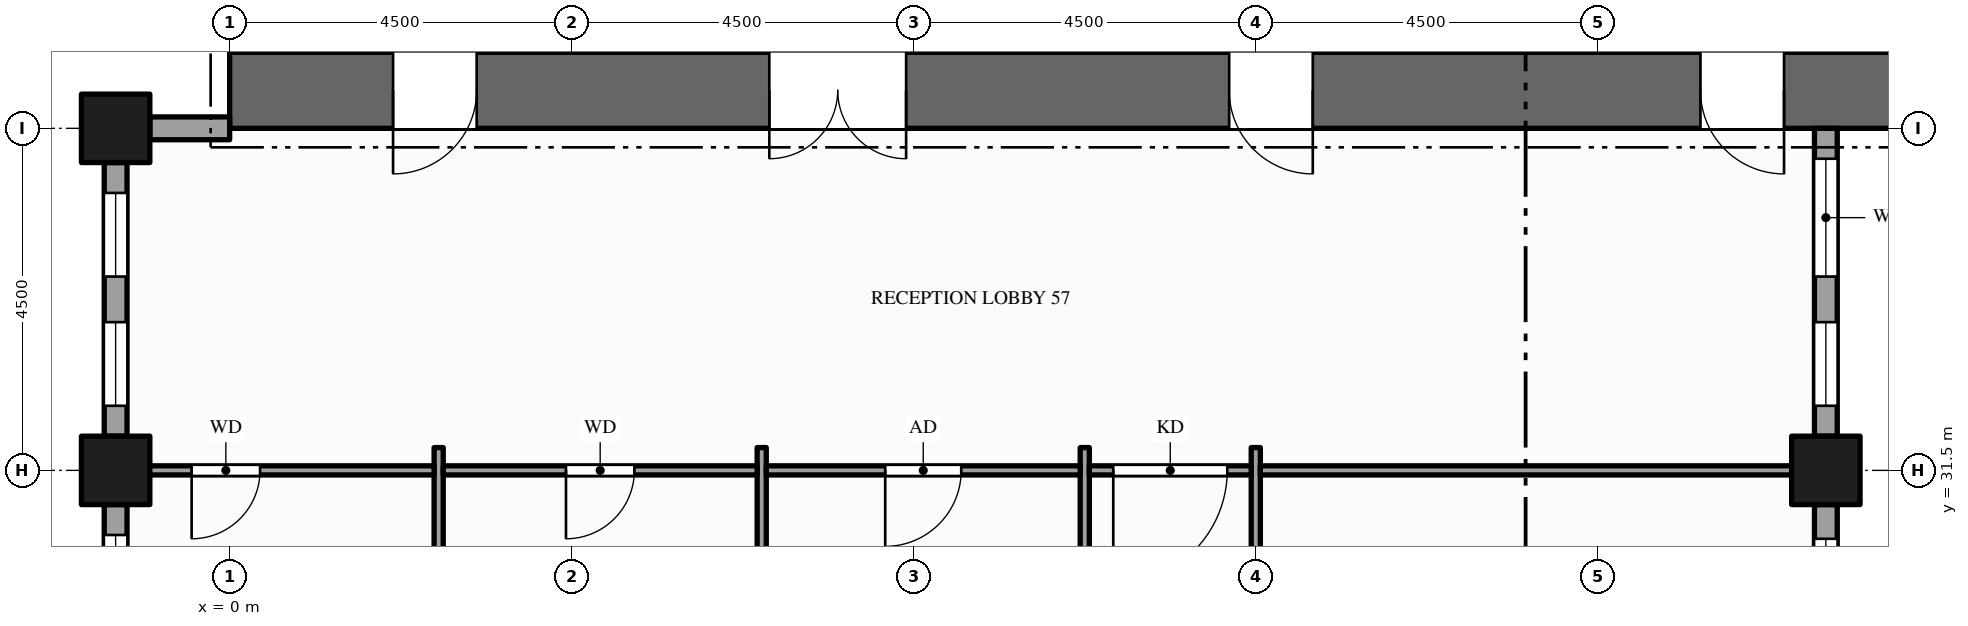
"""IFC4 building model, lengths in metres.
Left out: names, types, materials, properties, quantities, classifications, styles, units other than length and angle.
Written with IfcOpenShell. Run it as: python <this file> out.ifc"""

import sys

from ifc_helpers import new_model, si_unit, direction, frame, frame_2d, origin, origin_2d, place, context, subcontext, project, spatial, rectangle, hollow_rectangle, extrude, element, fill, save


model = new_model("IFC4")
c1 = context("Model", 3, precision=1e-05, world=origin(), true_north=direction((0.0, 1.0)))
c2 = subcontext(c1, "Body", "Model", "MODEL_VIEW")
j1 = project(units=[si_unit("LENGTHUNIT", "METRE"), si_unit("PLANEANGLEUNIT", "RADIAN")], contexts=[c1])
p1 = place(None, origin())
s1 = spatial("IfcSite", under=j1, at=p1, CompositionType="ELEMENT")
p2 = place(p1, origin())
s2 = spatial("IfcBuilding", under=s1, at=p2, CompositionType="ELEMENT")
p3 = place(p2, frame((0.0, 0.0, 151.0)))
s3 = spatial("IfcBuildingStorey", under=s2, at=p3, CompositionType="ELEMENT", Elevation=151.0)
p4 = place(p3, frame((0.0, 36.5, -0.15), z_axis=(0.0, 0.0, 1.0), x_axis=(1.0, 0.0, 0.0)))
e1 = element("IfcWall", 1, at=p4, inside=s3, PredefinedType="SHEAR", context=c2, shape_type="SweptSolid", body=[
    extrude(rectangle(XDim=22.5, YDim=1.0, at=frame_2d((11.25, 0.0))), origin(), (0.0, 0.0, 1.0), 4.0),
])
p5 = place(p4, frame((7.1, 0.0, 0.15)))
e2 = element("IfcOpeningElement", 2, at=p5, cuts=e1, PredefinedType="OPENING", context=c2, shape_type="SweptSolid", body=[
    extrude(rectangle(XDim=1.8, YDim=2.1, at=frame_2d((0.9, 1.05))), frame((0.0, 0.51, 0.0), z_axis=(0.0, -1.0, 0.0), x_axis=(1.0, 0.0, 0.0)), (0.0, 0.0, 1.0), 1.02),
])
p6 = place(p4, frame((13.15, 0.0, 0.15)))
e3 = element("IfcOpeningElement", 3, at=p6, cuts=e1, PredefinedType="OPENING", context=c2, shape_type="SweptSolid", body=[
    extrude(rectangle(XDim=1.1, YDim=2.1, at=frame_2d((0.55, 1.05))), frame((0.0, 0.51, 0.0), z_axis=(0.0, -1.0, 0.0), x_axis=(1.0, 0.0, 0.0)), (0.0, 0.0, 1.0), 1.02),
])
p7 = place(p4, frame((2.15, 0.0, 0.15)))
e4 = element("IfcOpeningElement", 4, at=p7, cuts=e1, PredefinedType="OPENING", context=c2, shape_type="SweptSolid", body=[
    extrude(rectangle(XDim=1.1, YDim=2.1, at=frame_2d((0.55, 1.05))), frame((0.0, 0.51, 0.0), z_axis=(0.0, -1.0, 0.0), x_axis=(1.0, 0.0, 0.0)), (0.0, 0.0, 1.0), 1.02),
])
p8 = place(p4, frame((19.35, 0.0, 0.15)))
e5 = element("IfcOpeningElement", 5, at=p8, cuts=e1, PredefinedType="OPENING", context=c2, shape_type="SweptSolid", body=[
    extrude(rectangle(XDim=1.1, YDim=2.1, at=frame_2d((0.55, 1.05))), frame((0.0, 0.51, 0.0), z_axis=(0.0, -1.0, 0.0), x_axis=(1.0, 0.0, 0.0)), (0.0, 0.0, 1.0), 1.02),
])
for number, where, z_axis, x_axis in (
    (6, (-1.5, 31.5, -0.15), (0.0, 0.0, 1.0), (1.0, 0.0, 0.0)),
    (7, (-1.5, 36.0, -0.15), (0.0, 0.0, 1.0), (1.0, 0.0, 0.0)),
    (8, (21.0, 31.5, -0.15), (0.0, 0.0, 1.0), (1.0, 0.0, 0.0)),
):
    element("IfcColumn", number, at=place(p3, frame(where, z_axis=z_axis, x_axis=x_axis)), inside=s3, PredefinedType="COLUMN", context=c2, shape_type="SweptSolid", body=[
        extrude(hollow_rectangle(XDim=0.9, YDim=0.9, WallThickness=0.045, at=origin_2d()), origin(), (0.0, 0.0, 1.0), 4.0),
    ])
p9 = place(p3, frame((21.0, 28.95, 0.0), z_axis=(0.0, 0.0, 1.0), x_axis=(0.0, 1.0, 0.0)))
e9 = element("IfcWall", 9, at=p9, inside=s3, PredefinedType="STANDARD", context=c2, shape_type="SweptSolid", body=[
    extrude(rectangle(XDim=2.1, YDim=0.3, at=frame_2d((1.05, 0.0))), origin(), (0.0, 0.0, 1.0), 3.149),
])
p10 = place(p9, frame((0.45, 0.0, 0.9)))
e10 = element("IfcOpeningElement", 10, at=p10, cuts=e9, PredefinedType="OPENING", context=c2, shape_type="SweptSolid", body=[
    extrude(rectangle(XDim=1.2, YDim=2.0, at=frame_2d((0.6, 1.0))), frame((0.0, 0.16, 0.0), z_axis=(0.0, -1.0, 0.0), x_axis=(1.0, 0.0, 0.0)), (0.0, 0.0, 1.0), 0.32),
])
p11 = place(p3, frame((21.0, 31.95, 0.0), z_axis=(0.0, 0.0, 1.0), x_axis=(0.0, 1.0, 0.0)))
e11 = element("IfcWall", 11, at=p11, inside=s3, PredefinedType="STANDARD", context=c2, shape_type="SweptSolid", body=[
    extrude(rectangle(XDim=4.05, YDim=0.3, at=frame_2d((2.025, 0.0))), origin(), (0.0, 0.0, 1.0), 3.149),
])
p12 = place(p11, frame((0.4, 0.0, 0.9)))
e12 = element("IfcOpeningElement", 12, at=p12, cuts=e11, PredefinedType="OPENING", context=c2, shape_type="SweptSolid", body=[
    extrude(rectangle(XDim=1.1, YDim=2.0, at=frame_2d((0.55, 1.0))), frame((0.0, 0.16, 0.0), z_axis=(0.0, -1.0, 0.0), x_axis=(1.0, 0.0, 0.0)), (0.0, 0.0, 1.0), 0.32),
])
p13 = place(p11, frame((2.1, 0.0, 0.9)))
e13 = element("IfcOpeningElement", 13, at=p13, cuts=e11, PredefinedType="OPENING", context=c2, shape_type="SweptSolid", body=[
    extrude(rectangle(XDim=1.55, YDim=2.0, at=frame_2d((0.775, 1.0))), frame((0.0, 0.16, 0.0), z_axis=(0.0, -1.0, 0.0), x_axis=(1.0, 0.0, 0.0)), (0.0, 0.0, 1.0), 0.32),
])
p14 = place(p3, frame((0.0, 36.0, 0.0), z_axis=(0.0, 0.0, 1.0), x_axis=(-1.0, 0.0, 0.0)))
e14 = element("IfcWall", 14, at=p14, inside=s3, PredefinedType="STANDARD", context=c2, shape_type="SweptSolid", body=[
    extrude(rectangle(XDim=1.05, YDim=0.3, at=frame_2d((0.525, 0.0))), origin(), (0.0, 0.0, 1.0), 2.87),
])
p15 = place(p3, frame((-1.5, 35.55, 0.0), z_axis=(0.0, 0.0, 1.0), x_axis=(0.0, -1.0, 0.0)))
e15 = element("IfcWall", 15, at=p15, inside=s3, PredefinedType="STANDARD", context=c2, shape_type="SweptSolid", body=[
    extrude(rectangle(XDim=3.6, YDim=0.3, at=frame_2d((1.8, 0.0))), origin(), (0.0, 0.0, 1.0), 3.149),
])
p16 = place(p15, frame((0.4, 0.0, 0.9)))
e16 = element("IfcOpeningElement", 16, at=p16, cuts=e15, PredefinedType="OPENING", context=c2, shape_type="SweptSolid", body=[
    extrude(rectangle(XDim=1.1, YDim=2.0, at=frame_2d((0.55, 1.0))), frame((0.0, 0.16, 0.0), z_axis=(0.0, -1.0, 0.0), x_axis=(1.0, 0.0, 0.0)), (0.0, 0.0, 1.0), 0.32),
])
p17 = place(p15, frame((2.1, 0.0, 0.9)))
e17 = element("IfcOpeningElement", 17, at=p17, cuts=e15, PredefinedType="OPENING", context=c2, shape_type="SweptSolid", body=[
    extrude(rectangle(XDim=1.1, YDim=2.0, at=frame_2d((0.55, 1.0))), frame((0.0, 0.16, 0.0), z_axis=(0.0, -1.0, 0.0), x_axis=(1.0, 0.0, 0.0)), (0.0, 0.0, 1.0), 0.32),
])
p18 = place(p3, frame((-1.5, 31.05, 0.0), z_axis=(0.0, 0.0, 1.0), x_axis=(0.0, -1.0, 0.0)))
e18 = element("IfcWall", 18, at=p18, inside=s3, PredefinedType="STANDARD", context=c2, shape_type="SweptSolid", body=[
    extrude(rectangle(XDim=3.6, YDim=0.3, at=frame_2d((1.8, 0.0))), origin(), (0.0, 0.0, 1.0), 3.149),
])
p19 = place(p18, frame((0.4, 0.0, 0.9)))
e19 = element("IfcOpeningElement", 19, at=p19, cuts=e18, PredefinedType="OPENING", context=c2, shape_type="SweptSolid", body=[
    extrude(rectangle(XDim=1.1, YDim=2.0, at=frame_2d((0.55, 1.0))), frame((0.0, 0.16, 0.0), z_axis=(0.0, -1.0, 0.0), x_axis=(1.0, 0.0, 0.0)), (0.0, 0.0, 1.0), 0.32),
])
p20 = place(p18, frame((2.1, 0.0, 0.9)))
e20 = element("IfcOpeningElement", 20, at=p20, cuts=e18, PredefinedType="OPENING", context=c2, shape_type="SweptSolid", body=[
    extrude(rectangle(XDim=1.1, YDim=2.0, at=frame_2d((0.55, 1.0))), frame((0.0, 0.16, 0.0), z_axis=(0.0, -1.0, 0.0), x_axis=(1.0, 0.0, 0.0)), (0.0, 0.0, 1.0), 0.32),
])
for number, where, z_axis, x_axis in (
    (21, (2.75, 26.7, 0.0), (0.0, 0.0, 1.0), (0.0, 1.0, 0.0)),
    (22, (7.0, 26.7, 0.0), (0.0, 0.0, 1.0), (0.0, 1.0, 0.0)),
):
    element("IfcWall", number, at=place(p3, frame(where, z_axis=z_axis, x_axis=x_axis)), inside=s3, PredefinedType="PARTITIONING", context=c2, shape_type="SweptSolid", body=[
        extrude(rectangle(XDim=5.1, YDim=0.12, at=frame_2d((2.55, 0.0))), origin(), (0.0, 0.0, 1.0), 3.85),
    ])
p21 = place(p3, frame((11.25, 10.95, 0.0), z_axis=(0.0, 0.0, 1.0), x_axis=(0.0, 1.0, 0.0)))
e23 = element("IfcWall", 23, at=p21, inside=s3, PredefinedType="PARTITIONING", context=c2, shape_type="SweptSolid", body=[
    extrude(rectangle(XDim=20.85, YDim=0.12, at=frame_2d((10.425, 0.0))), origin(), (0.0, 0.0, 1.0), 2.6),
])
p22 = place(p21, frame((2.05, 0.0, 0.0)))
e24 = element("IfcOpeningElement", 24, at=p22, cuts=e23, PredefinedType="OPENING", context=c2, shape_type="SweptSolid", body=[
    extrude(rectangle(XDim=1.0, YDim=2.1, at=frame_2d((0.5, 1.05))), frame((0.0, 0.07, 0.0), z_axis=(0.0, -1.0, 0.0), x_axis=(1.0, 0.0, 0.0)), (0.0, 0.0, 1.0), 0.14),
])
p23 = place(p21, frame((6.55, 0.0, 0.0)))
e25 = element("IfcOpeningElement", 25, at=p23, cuts=e23, PredefinedType="OPENING", context=c2, shape_type="SweptSolid", body=[
    extrude(rectangle(XDim=1.0, YDim=2.1, at=frame_2d((0.5, 1.05))), frame((0.0, 0.07, 0.0), z_axis=(0.0, -1.0, 0.0), x_axis=(1.0, 0.0, 0.0)), (0.0, 0.0, 1.0), 0.14),
])
p24 = place(p21, frame((12.205, 0.0, 0.0)))
e26 = element("IfcOpeningElement", 26, at=p24, cuts=e23, PredefinedType="OPENING", context=c2, shape_type="SweptSolid", body=[
    extrude(rectangle(XDim=1.0, YDim=2.1, at=frame_2d((0.5, 1.05))), frame((0.0, 0.07, 0.0), z_axis=(0.0, -1.0, 0.0), x_axis=(1.0, 0.0, 0.0)), (0.0, 0.0, 1.0), 0.14),
])
p25 = place(p3, frame((13.5, 10.95, 0.0), z_axis=(0.0, 0.0, 1.0), x_axis=(0.0, 1.0, 0.0)))
e27 = element("IfcWall", 27, at=p25, inside=s3, PredefinedType="PARTITIONING", context=c2, shape_type="SweptSolid", body=[
    extrude(rectangle(XDim=20.85, YDim=0.12, at=frame_2d((10.425, 0.0))), origin(), (0.0, 0.0, 1.0), 2.6),
])
p26 = place(p25, frame((17.8, 0.0, 0.0)))
e28 = element("IfcOpeningElement", 28, at=p26, cuts=e27, PredefinedType="OPENING", context=c2, shape_type="SweptSolid", body=[
    extrude(rectangle(XDim=1.0, YDim=2.1, at=frame_2d((0.5, 1.05))), frame((0.0, 0.07, 0.0), z_axis=(0.0, -1.0, 0.0), x_axis=(1.0, 0.0, 0.0)), (0.0, 0.0, 1.0), 0.14),
])
p27 = place(p25, frame((4.2, 0.0, 0.0)))
e29 = element("IfcOpeningElement", 29, at=p27, cuts=e27, PredefinedType="OPENING", context=c2, shape_type="SweptSolid", body=[
    extrude(rectangle(XDim=1.2, YDim=2.1, at=frame_2d((0.6, 1.05))), frame((0.0, 0.07, 0.0), z_axis=(0.0, -1.0, 0.0), x_axis=(1.0, 0.0, 0.0)), (0.0, 0.0, 1.0), 0.14),
])
p28 = place(p3, frame((-1.35, 31.5, 0.0), z_axis=(0.0, 0.0, 1.0), x_axis=(1.0, 0.0, 0.0)))
e30 = element("IfcWall", 30, at=p28, inside=s3, PredefinedType="PARTITIONING", context=c2, shape_type="SweptSolid", body=[
    extrude(rectangle(XDim=4.04, YDim=0.12, at=frame_2d((2.02, 0.0))), origin(), (0.0, 0.0, 1.0), 2.87),
])
p29 = place(p28, frame((0.85, 0.0, 0.0)))
e31 = element("IfcOpeningElement", 31, at=p29, cuts=e30, PredefinedType="OPENING", context=c2, shape_type="SweptSolid", body=[
    extrude(rectangle(XDim=0.9, YDim=2.1, at=frame_2d((0.45, 1.05))), frame((0.0, 0.07, 0.0), z_axis=(0.0, -1.0, 0.0), x_axis=(1.0, 0.0, 0.0)), (0.0, 0.0, 1.0), 0.14),
])
p30 = place(p3, frame((2.81, 31.5, 0.0), z_axis=(0.0, 0.0, 1.0), x_axis=(1.0, 0.0, 0.0)))
e32 = element("IfcWall", 32, at=p30, inside=s3, PredefinedType="PARTITIONING", context=c2, shape_type="SweptSolid", body=[
    extrude(rectangle(XDim=4.13, YDim=0.12, at=frame_2d((2.065, 0.0))), origin(), (0.0, 0.0, 1.0), 2.87),
])
p31 = place(p30, frame((1.615, 0.0, 0.0)))
e33 = element("IfcOpeningElement", 33, at=p31, cuts=e32, PredefinedType="OPENING", context=c2, shape_type="SweptSolid", body=[
    extrude(rectangle(XDim=0.9, YDim=2.1, at=frame_2d((0.45, 1.05))), frame((0.0, 0.07, 0.0), z_axis=(0.0, -1.0, 0.0), x_axis=(1.0, 0.0, 0.0)), (0.0, 0.0, 1.0), 0.14),
])
p32 = place(p3, frame((7.06, 31.5, 0.0), z_axis=(0.0, 0.0, 1.0), x_axis=(1.0, 0.0, 0.0)))
e34 = element("IfcWall", 34, at=p32, inside=s3, PredefinedType="PARTITIONING", context=c2, shape_type="SweptSolid", body=[
    extrude(rectangle(XDim=4.13, YDim=0.12, at=frame_2d((2.065, 0.0))), origin(), (0.0, 0.0, 1.0), 2.87),
])
p33 = place(p32, frame((1.565, 0.0, 0.0)))
e35 = element("IfcOpeningElement", 35, at=p33, cuts=e34, PredefinedType="OPENING", context=c2, shape_type="SweptSolid", body=[
    extrude(rectangle(XDim=1.0, YDim=2.1, at=frame_2d((0.5, 1.05))), frame((0.0, 0.07, 0.0), z_axis=(0.0, -1.0, 0.0), x_axis=(1.0, 0.0, 0.0)), (0.0, 0.0, 1.0), 0.14),
])
p34 = place(p3, frame((11.31, 31.5, 0.0), z_axis=(0.0, 0.0, 1.0), x_axis=(1.0, 0.0, 0.0)))
e36 = element("IfcWall", 36, at=p34, inside=s3, PredefinedType="PARTITIONING", context=c2, shape_type="SweptSolid", body=[
    extrude(rectangle(XDim=2.13, YDim=0.12, at=frame_2d((1.065, 0.0))), origin(), (0.0, 0.0, 1.0), 2.87),
])
p35 = place(p34, frame((0.315, 0.0, 0.0)))
e37 = element("IfcOpeningElement", 37, at=p35, cuts=e36, PredefinedType="OPENING", context=c2, shape_type="SweptSolid", body=[
    extrude(rectangle(XDim=1.5, YDim=2.1, at=frame_2d((0.75, 1.05))), frame((0.0, 0.07, 0.0), z_axis=(0.0, -1.0, 0.0), x_axis=(1.0, 0.0, 0.0)), (0.0, 0.0, 1.0), 0.14),
])
p36 = place(p3, frame((13.56, 31.5, 0.0), z_axis=(0.0, 0.0, 1.0), x_axis=(1.0, 0.0, 0.0)))
e38 = element("IfcWall", 38, at=p36, inside=s3, PredefinedType="PARTITIONING", context=c2, shape_type="SweptSolid", body=[
    extrude(rectangle(XDim=7.29, YDim=0.12, at=frame_2d((3.645, 0.0))), origin(), (0.0, 0.0, 1.0), 2.87),
])
p37 = place(p10, origin())
e39 = element("IfcWindow", 39, at=p37, inside=s3, PartitioningType="SINGLE_PANEL", PredefinedType="WINDOW", context=c2, shape_type="SweptSolid", body=[
    extrude(rectangle(XDim=1.2, YDim=2.0, at=frame_2d((0.6, 1.0))), frame((0.0, 0.03, 0.0), z_axis=(0.0, -1.0, 0.0), x_axis=(1.0, 0.0, 0.0)), (0.0, 0.0, 1.0), 0.06),
])
fill(e10, e39)
p38 = place(p12, origin())
e40 = element("IfcWindow", 40, at=p38, inside=s3, PartitioningType="SINGLE_PANEL", PredefinedType="WINDOW", context=c2, shape_type="SweptSolid", body=[
    extrude(rectangle(XDim=1.1, YDim=2.0, at=frame_2d((0.55, 1.0))), frame((0.0, 0.03, 0.0), z_axis=(0.0, -1.0, 0.0), x_axis=(1.0, 0.0, 0.0)), (0.0, 0.0, 1.0), 0.06),
])
fill(e12, e40)
p39 = place(p13, origin())
e41 = element("IfcWindow", 41, at=p39, inside=s3, PartitioningType="SINGLE_PANEL", PredefinedType="WINDOW", context=c2, shape_type="SweptSolid", body=[
    extrude(rectangle(XDim=1.55, YDim=2.0, at=frame_2d((0.775, 1.0))), frame((0.0, 0.03, 0.0), z_axis=(0.0, -1.0, 0.0), x_axis=(1.0, 0.0, 0.0)), (0.0, 0.0, 1.0), 0.06),
])
fill(e13, e41)
p40 = place(p16, origin())
e42 = element("IfcWindow", 42, at=p40, inside=s3, PartitioningType="SINGLE_PANEL", PredefinedType="WINDOW", context=c2, shape_type="SweptSolid", body=[
    extrude(rectangle(XDim=1.1, YDim=2.0, at=frame_2d((0.55, 1.0))), frame((0.0, 0.03, 0.0), z_axis=(0.0, -1.0, 0.0), x_axis=(1.0, 0.0, 0.0)), (0.0, 0.0, 1.0), 0.06),
])
fill(e16, e42)
p41 = place(p17, origin())
e43 = element("IfcWindow", 43, at=p41, inside=s3, PartitioningType="SINGLE_PANEL", PredefinedType="WINDOW", context=c2, shape_type="SweptSolid", body=[
    extrude(rectangle(XDim=1.1, YDim=2.0, at=frame_2d((0.55, 1.0))), frame((0.0, 0.03, 0.0), z_axis=(0.0, -1.0, 0.0), x_axis=(1.0, 0.0, 0.0)), (0.0, 0.0, 1.0), 0.06),
])
fill(e17, e43)
p42 = place(p19, origin())
e44 = element("IfcWindow", 44, at=p42, inside=s3, PartitioningType="SINGLE_PANEL", PredefinedType="WINDOW", context=c2, shape_type="SweptSolid", body=[
    extrude(rectangle(XDim=1.1, YDim=2.0, at=frame_2d((0.55, 1.0))), frame((0.0, 0.03, 0.0), z_axis=(0.0, -1.0, 0.0), x_axis=(1.0, 0.0, 0.0)), (0.0, 0.0, 1.0), 0.06),
])
fill(e19, e44)
p43 = place(p5, origin())
e45 = element("IfcDoor", 45, at=p43, inside=s3, OperationType="DOUBLE_DOOR_SINGLE_SWING", PredefinedType="DOOR", context=c2, shape_type="SweptSolid", body=[
    extrude(rectangle(XDim=1.8, YDim=2.1, at=frame_2d((0.9, 1.05))), frame((0.0, 0.025, 0.0), z_axis=(0.0, -1.0, 0.0), x_axis=(1.0, 0.0, 0.0)), (0.0, 0.0, 1.0), 0.05),
])
fill(e2, e45)
p44 = place(p6, origin())
e46 = element("IfcDoor", 46, at=p44, inside=s3, OperationType="SINGLE_SWING_RIGHT", PredefinedType="DOOR", context=c2, shape_type="SweptSolid", body=[
    extrude(rectangle(XDim=1.1, YDim=2.1, at=frame_2d((0.55, 1.05))), frame((0.0, 0.025, 0.0), z_axis=(0.0, -1.0, 0.0), x_axis=(1.0, 0.0, 0.0)), (0.0, 0.0, 1.0), 0.05),
])
fill(e3, e46)
p45 = place(p7, origin())
e47 = element("IfcDoor", 47, at=p45, inside=s3, OperationType="SINGLE_SWING_LEFT", PredefinedType="DOOR", context=c2, shape_type="SweptSolid", body=[
    extrude(rectangle(XDim=1.1, YDim=2.1, at=frame_2d((0.55, 1.05))), frame((0.0, 0.025, 0.0), z_axis=(0.0, -1.0, 0.0), x_axis=(1.0, 0.0, 0.0)), (0.0, 0.0, 1.0), 0.05),
])
fill(e4, e47)
p46 = place(p8, origin())
e48 = element("IfcDoor", 48, at=p46, inside=s3, OperationType="SINGLE_SWING_RIGHT", PredefinedType="DOOR", context=c2, shape_type="SweptSolid", body=[
    extrude(rectangle(XDim=1.1, YDim=2.1, at=frame_2d((0.55, 1.05))), frame((0.0, 0.025, 0.0), z_axis=(0.0, -1.0, 0.0), x_axis=(1.0, 0.0, 0.0)), (0.0, 0.0, 1.0), 0.05),
])
fill(e5, e48)
p47 = place(p35, origin())
e49 = element("IfcDoor", 49, at=p47, inside=s3, OperationType="SINGLE_SWING_LEFT", PredefinedType="DOOR", context=c2, shape_type="SweptSolid", body=[
    extrude(rectangle(XDim=1.5, YDim=2.1, at=frame_2d((0.75, 1.05))), frame((0.0, 0.025, 0.0), z_axis=(0.0, -1.0, 0.0), x_axis=(1.0, 0.0, 0.0)), (0.0, 0.0, 1.0), 0.05),
])
fill(e37, e49)
p48 = place(p29, origin())
e50 = element("IfcDoor", 50, at=p48, inside=s3, OperationType="SINGLE_SWING_LEFT", PredefinedType="DOOR", context=c2, shape_type="SweptSolid", body=[
    extrude(rectangle(XDim=0.9, YDim=2.1, at=frame_2d((0.45, 1.05))), frame((0.0, 0.025, 0.0), z_axis=(0.0, -1.0, 0.0), x_axis=(1.0, 0.0, 0.0)), (0.0, 0.0, 1.0), 0.05),
])
fill(e31, e50)
p49 = place(p31, origin())
e51 = element("IfcDoor", 51, at=p49, inside=s3, OperationType="SINGLE_SWING_LEFT", PredefinedType="DOOR", context=c2, shape_type="SweptSolid", body=[
    extrude(rectangle(XDim=0.9, YDim=2.1, at=frame_2d((0.45, 1.05))), frame((0.0, 0.025, 0.0), z_axis=(0.0, -1.0, 0.0), x_axis=(1.0, 0.0, 0.0)), (0.0, 0.0, 1.0), 0.05),
])
fill(e33, e51)
p50 = place(p33, origin())
e52 = element("IfcDoor", 52, at=p50, inside=s3, OperationType="SINGLE_SWING_LEFT", PredefinedType="DOOR", context=c2, shape_type="SweptSolid", body=[
    extrude(rectangle(XDim=1.0, YDim=2.1, at=frame_2d((0.5, 1.05))), frame((0.0, 0.025, 0.0), z_axis=(0.0, -1.0, 0.0), x_axis=(1.0, 0.0, 0.0)), (0.0, 0.0, 1.0), 0.05),
])
fill(e35, e52)
save(model, sys.argv[1])
